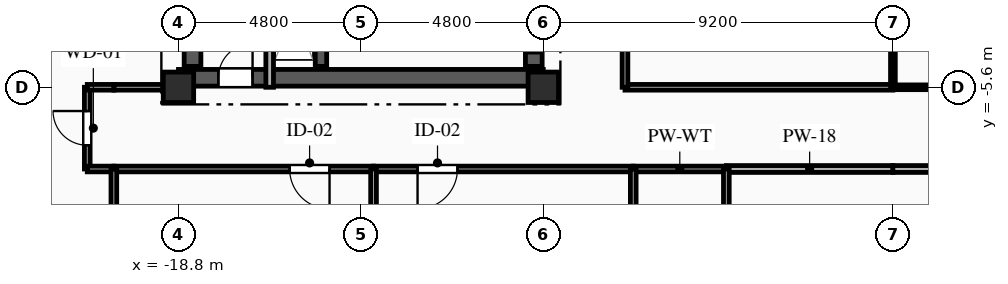
"""IFC4 building model, lengths in metres.
Left out: names, types, materials, properties, quantities, classifications, styles, units other than length and angle.
Written with IfcOpenShell. Run it as: python <this file> out.ifc"""

import sys

from ifc_helpers import new_model, si_unit, direction, frame, frame_2d, origin, origin_2d, place, context, subcontext, project, spatial, rectangle, extrude, element, fill, save


model = new_model("IFC4")
c1 = context("Model", 3, precision=1e-05, world=origin(), true_north=direction((0.0, 1.0)))
c2 = subcontext(c1, "Body", "Model", "MODEL_VIEW")
j1 = project(units=[si_unit("LENGTHUNIT", "METRE"), si_unit("PLANEANGLEUNIT", "RADIAN")], contexts=[c1])
p1 = place(None, origin())
s1 = spatial("IfcSite", under=j1, at=p1, CompositionType="ELEMENT")
p2 = place(p1, origin())
s2 = spatial("IfcBuilding", under=s1, at=p2, CompositionType="ELEMENT")
p3 = place(p2, frame((0.0, 0.0, 238.35)))
s3 = spatial("IfcBuildingStorey", under=s2, at=p3, CompositionType="ELEMENT", Elevation=238.35)
for number, where, z_axis, x_axis in (
    (1, (-18.8, -5.6, 0.0), (0.0, 0.0, 1.0), (1.0, 0.0, 0.0)),
    (2, (-9.2, -5.6, 0.0), (0.0, 0.0, 1.0), (1.0, 0.0, 0.0)),
):
    element("IfcColumn", number, at=place(p3, frame(where, z_axis=z_axis, x_axis=x_axis)), inside=s3, PredefinedType="COLUMN", context=c2, shape_type="SweptSolid", body=[
        extrude(rectangle(XDim=0.8, YDim=0.8, at=origin_2d()), origin(), (0.0, 0.0, 1.0), 3.35),
    ])
p4 = place(p3, frame((-18.8, -5.35, 0.0), z_axis=(0.0, 0.0, 1.0), x_axis=(1.0, 0.0, 0.0)))
e3 = element("IfcWall", 3, at=p4, inside=s3, PredefinedType="SHEAR", context=c2, shape_type="SweptSolid", body=[
    extrude(rectangle(XDim=9.6, YDim=0.44, at=frame_2d((4.8, 0.0))), origin(), (0.0, 0.0, 1.0), 3.04),
])
p5 = place(p4, frame((1.05, 0.0, 0.0)))
e4 = element("IfcOpeningElement", 4, at=p5, cuts=e3, PredefinedType="OPENING", context=c2, shape_type="SweptSolid", body=[
    extrude(rectangle(XDim=0.9, YDim=2.1, at=frame_2d((0.45, 1.05))), frame((0.0, 0.23, 0.0), z_axis=(0.0, -1.0, 0.0), x_axis=(1.0, 0.0, 0.0)), (0.0, 0.0, 1.0), 0.46),
])
p6 = place(p3, frame((-18.43, -5.05, 0.0), z_axis=(0.0, 0.0, 1.0), x_axis=(0.0, 1.0, 0.0)))
e5 = element("IfcWall", 5, at=p6, inside=s3, PredefinedType="SHEAR", context=c2, shape_type="SweptSolid", body=[
    extrude(rectangle(XDim=10.1, YDim=0.44, at=frame_2d((5.05, 0.0))), origin(), (0.0, 0.0, 1.0), 3.04),
])
p7 = place(p3, frame((-9.45, -5.05, 0.0), z_axis=(0.0, 0.0, 1.0), x_axis=(0.0, 1.0, 0.0)))
e6 = element("IfcWall", 6, at=p7, inside=s3, PredefinedType="SHEAR", context=c2, shape_type="SweptSolid", body=[
    extrude(rectangle(XDim=10.1, YDim=0.44, at=frame_2d((5.05, 0.0))), origin(), (0.0, 0.0, 1.0), 3.04),
])
p8 = place(p7, frame((7.15, 0.0, 0.0)))
e7 = element("IfcOpeningElement", 7, at=p8, cuts=e6, PredefinedType="OPENING", context=c2, shape_type="SweptSolid", body=[
    extrude(rectangle(XDim=0.9, YDim=2.1, at=frame_2d((0.45, 1.05))), frame((0.0, 0.23, 0.0), z_axis=(0.0, -1.0, 0.0), x_axis=(1.0, 0.0, 0.0)), (0.0, 0.0, 1.0), 0.46),
])
p9 = place(p7, frame((2.4, 0.0, 0.0)))
e8 = element("IfcOpeningElement", 8, at=p9, cuts=e6, PredefinedType="OPENING", context=c2, shape_type="SweptSolid", body=[
    extrude(rectangle(XDim=1.2, YDim=2.15, at=frame_2d((0.6, 1.075))), frame((0.0, 0.23, 0.0), z_axis=(0.0, -1.0, 0.0), x_axis=(1.0, 0.0, 0.0)), (0.0, 0.0, 1.0), 0.46),
])
p10 = place(p7, frame((0.35, 0.0, 0.0)))
e9 = element("IfcOpeningElement", 9, at=p10, cuts=e6, PredefinedType="OPENING", context=c2, shape_type="SweptSolid", body=[
    extrude(rectangle(XDim=0.9, YDim=2.1, at=frame_2d((0.45, 1.05))), frame((0.0, 0.23, 0.0), z_axis=(0.0, -1.0, 0.0), x_axis=(1.0, 0.0, 0.0)), (0.0, 0.0, 1.0), 0.46),
])
p11 = place(p7, frame((5.0, 0.0, 0.0)))
e10 = element("IfcOpeningElement", 10, at=p11, cuts=e6, PredefinedType="OPENING", context=c2, shape_type="SweptSolid", body=[
    extrude(rectangle(XDim=0.9, YDim=2.1, at=frame_2d((0.45, 1.05))), frame((0.0, 0.23, 0.0), z_axis=(0.0, -1.0, 0.0), x_axis=(1.0, 0.0, 0.0)), (0.0, 0.0, 1.0), 0.46),
])
p12 = place(p3, frame((-15.05, -5.05, 0.0), z_axis=(0.0, 0.0, 1.0), x_axis=(0.0, 1.0, 0.0)))
e11 = element("IfcWall", 11, at=p12, inside=s3, PredefinedType="SHEAR", context=c2, shape_type="SweptSolid", body=[
    extrude(rectangle(XDim=10.1, YDim=0.3, at=frame_2d((5.05, 0.0))), origin(), (0.0, 0.0, 1.0), 3.04),
])
p13 = place(p3, frame((-16.4, -5.6, 0.0), z_axis=(0.0, 0.0, 1.0), x_axis=(0.0, 1.0, 0.0)))
e12 = element("IfcWall", 12, at=p13, inside=s3, PredefinedType="PARTITIONING", context=c2, shape_type="SweptSolid", body=[
    extrude(rectangle(XDim=3.49, YDim=0.2, at=frame_2d((1.745, 0.0))), origin(), (0.0, 0.0, 1.0), 3.04),
])
p14 = place(p3, frame((-21.2, -7.75, 0.0), z_axis=(0.0, 0.0, 1.0), x_axis=(0.0, 1.0, 0.0)))
e13 = element("IfcWall", 13, at=p14, inside=s3, PredefinedType="PARTITIONING", context=c2, shape_type="SweptSolid", body=[
    extrude(rectangle(XDim=2.15, YDim=0.15, at=frame_2d((1.075, 0.0))), origin(), (0.0, 0.0, 1.0), 2.695),
])
p15 = place(p14, frame((0.625, 0.0, 0.0)))
e14 = element("IfcOpeningElement", 14, at=p15, cuts=e13, PredefinedType="OPENING", context=c2, shape_type="SweptSolid", body=[
    extrude(rectangle(XDim=0.9, YDim=2.1, at=frame_2d((0.45, 1.05))), frame((0.0, 0.085, 0.0), z_axis=(0.0, -1.0, 0.0), x_axis=(1.0, 0.0, 0.0)), (0.0, 0.0, 1.0), 0.17),
])
p16 = place(p3, frame((-20.5, -5.6, 0.0), z_axis=(0.0, 0.0, 1.0), x_axis=(1.0, 0.0, 0.0)))
e15 = element("IfcWall", 15, at=p16, inside=s3, PredefinedType="PARTITIONING", context=c2, shape_type="SweptSolid", body=[
    extrude(rectangle(XDim=1.7, YDim=0.15, at=frame_2d((0.85, 0.0))), origin(), (0.0, 0.0, 1.0), 3.04),
])
for number, where, z_axis, x_axis in (
    (16, (-20.5, -7.75, 0.0), (0.0, 0.0, 1.0), (-1.0, 0.0, 0.0)),
    (17, (-21.2, -5.6, 0.0), (0.0, 0.0, 1.0), (1.0, 0.0, 0.0)),
):
    element("IfcWall", number, at=place(p3, frame(where, z_axis=z_axis, x_axis=x_axis)), inside=s3, PredefinedType="PARTITIONING", context=c2, shape_type="SweptSolid", body=[
        extrude(rectangle(XDim=0.7, YDim=0.15, at=frame_2d((0.35, 0.0))), origin(), (0.0, 0.0, 1.0), 3.04),
    ])
p17 = place(p3, frame((-13.667, -7.75, 0.0), z_axis=(0.0, 0.0, 1.0), x_axis=(-1.0, 0.0, 0.0)))
e18 = element("IfcWall", 18, at=p17, inside=s3, PredefinedType="PARTITIONING", context=c2, shape_type="SweptSolid", body=[
    extrude(rectangle(XDim=6.833, YDim=0.15, at=frame_2d((3.417, 0.0))), origin(), (0.0, 0.0, 1.0), 3.04),
])
p18 = place(p17, frame((1.158, 0.0, 0.0)))
e19 = element("IfcOpeningElement", 19, at=p18, cuts=e18, PredefinedType="OPENING", context=c2, shape_type="SweptSolid", body=[
    extrude(rectangle(XDim=1.05, YDim=2.15, at=frame_2d((0.525, 1.075))), frame((0.0, 0.085, 0.0), z_axis=(0.0, -1.0, 0.0), x_axis=(1.0, 0.0, 0.0)), (0.0, 0.0, 1.0), 0.17),
])
p19 = place(p3, frame((-6.833, -7.75, 0.0), z_axis=(0.0, 0.0, 1.0), x_axis=(-1.0, 0.0, 0.0)))
e20 = element("IfcWall", 20, at=p19, inside=s3, PredefinedType="PARTITIONING", context=c2, shape_type="SweptSolid", body=[
    extrude(rectangle(XDim=6.833, YDim=0.15, at=frame_2d((3.417, 0.0))), origin(), (0.0, 0.0, 1.0), 3.04),
])
p20 = place(p19, frame((4.625, 0.0, 0.0)))
e21 = element("IfcOpeningElement", 21, at=p20, cuts=e20, PredefinedType="OPENING", context=c2, shape_type="SweptSolid", body=[
    extrude(rectangle(XDim=1.05, YDim=2.15, at=frame_2d((0.525, 1.075))), frame((0.0, 0.085, 0.0), z_axis=(0.0, -1.0, 0.0), x_axis=(1.0, 0.0, 0.0)), (0.0, 0.0, 1.0), 0.17),
])
p21 = place(p3, frame((0.0, -7.75, 0.0), z_axis=(0.0, 0.0, 1.0), x_axis=(-1.0, 0.0, 0.0)))
e22 = element("IfcWall", 22, at=p21, inside=s3, PredefinedType="PARTITIONING", context=c2, shape_type="SweptSolid", body=[
    extrude(rectangle(XDim=4.383, YDim=0.18, at=frame_2d((2.191, 0.0))), origin(), (0.0, 0.0, 1.0), 3.04),
])
p22 = place(p3, frame((-4.383, -7.75, 0.0), z_axis=(0.0, 0.0, 1.0), x_axis=(-1.0, 0.0, 0.0)))
e23 = element("IfcWall", 23, at=p22, inside=s3, PredefinedType="PLUMBINGWALL", context=c2, shape_type="SweptSolid", body=[
    extrude(rectangle(XDim=2.45, YDim=0.15, at=frame_2d((1.225, 0.0))), origin(), (0.0, 0.0, 1.0), 3.04),
])
p23 = place(p3, frame((-7.05, -5.6, 0.0), z_axis=(0.0, 0.0, 1.0), x_axis=(1.0, 0.0, 0.0)))
e24 = element("IfcWall", 24, at=p23, inside=s3, PredefinedType="PARTITIONING", context=c2, shape_type="SweptSolid", body=[
    extrude(rectangle(XDim=7.05, YDim=0.15, at=frame_2d((3.525, 0.0))), origin(), (0.0, 0.0, 1.0), 2.525),
])
p24 = place(p3, frame((6.833, -7.75, 0.0), z_axis=(0.0, 0.0, 1.0), x_axis=(-1.0, 0.0, 0.0)))
e25 = element("IfcWall", 25, at=p24, inside=s3, PredefinedType="PARTITIONING", context=c2, shape_type="SweptSolid", body=[
    extrude(rectangle(XDim=6.833, YDim=0.18, at=frame_2d((3.417, 0.0))), origin(), (0.0, 0.0, 1.0), 3.04),
])
p25 = place(p24, frame((4.669, 0.0, 0.0)))
e26 = element("IfcOpeningElement", 26, at=p25, cuts=e25, PredefinedType="OPENING", context=c2, shape_type="SweptSolid", body=[
    extrude(rectangle(XDim=1.0, YDim=2.15, at=frame_2d((0.5, 1.075))), frame((0.0, 0.1, 0.0), z_axis=(0.0, -1.0, 0.0), x_axis=(1.0, 0.0, 0.0)), (0.0, 0.0, 1.0), 0.2),
])
p26 = place(p3, frame((0.0, -5.6, 0.0), z_axis=(0.0, 0.0, 1.0), x_axis=(1.0, 0.0, 0.0)))
e27 = element("IfcWall", 27, at=p26, inside=s3, PredefinedType="PARTITIONING", context=c2, shape_type="SweptSolid", body=[
    extrude(rectangle(XDim=7.05, YDim=0.125, at=frame_2d((3.525, 0.0))), origin(), (0.0, 0.0, 1.0), 2.525),
])
p27 = place(p3, frame((-7.05, 8.5, 0.0), z_axis=(0.0, 0.0, 1.0), x_axis=(0.0, -1.0, 0.0)))
e28 = element("IfcWall", 28, at=p27, inside=s3, PredefinedType="PARTITIONING", context=c2, shape_type="SweptSolid", body=[
    extrude(rectangle(XDim=14.1, YDim=0.15, at=frame_2d((7.05, 0.0))), origin(), (0.0, 0.0, 1.0), 3.04),
])
p28 = place(p27, frame((8.074, 0.0, 0.0)))
e29 = element("IfcOpeningElement", 29, at=p28, cuts=e28, PredefinedType="OPENING", context=c2, shape_type="SweptSolid", body=[
    extrude(rectangle(XDim=0.95, YDim=2.1, at=frame_2d((0.475, 1.05))), frame((0.0, 0.085, 0.0), z_axis=(0.0, -1.0, 0.0), x_axis=(1.0, 0.0, 0.0)), (0.0, 0.0, 1.0), 0.17),
])
p29 = place(p3, frame((-20.5, -7.75, 0.0), z_axis=(0.0, 0.0, 1.0), x_axis=(0.0, -1.0, 0.0)))
e30 = element("IfcWall", 30, at=p29, inside=s3, PredefinedType="PARTITIONING", context=c2, shape_type="SweptSolid", body=[
    extrude(rectangle(XDim=10.65, YDim=0.15, at=frame_2d((5.325, 0.0))), origin(), (0.0, 0.0, 1.0), 2.665),
])
p30 = place(p3, frame((-13.667, -7.75, 0.0), z_axis=(0.0, 0.0, 1.0), x_axis=(0.0, -1.0, 0.0)))
e31 = element("IfcWall", 31, at=p30, inside=s3, PredefinedType="PARTITIONING", context=c2, shape_type="SweptSolid", body=[
    extrude(rectangle(XDim=10.65, YDim=0.15, at=frame_2d((5.325, 0.0))), origin(), (0.0, 0.0, 1.0), 3.04),
])
for number, where, z_axis, x_axis in (
    (32, (-6.833, -7.75, 0.0), (0.0, 0.0, 1.0), (0.0, -1.0, 0.0)),
    (33, (-4.383, -9.9, 0.0), (0.0, 0.0, 1.0), (0.0, 1.0, 0.0)),
):
    element("IfcWall", number, at=place(p3, frame(where, z_axis=z_axis, x_axis=x_axis)), inside=s3, PredefinedType="PLUMBINGWALL", context=c2, shape_type="SweptSolid", body=[
        extrude(rectangle(XDim=2.15, YDim=0.15, at=frame_2d((1.075, 0.0))), origin(), (0.0, 0.0, 1.0), 3.04),
    ])
p31 = place(p3, frame((0.0, 8.5, 0.0), z_axis=(0.0, 0.0, 1.0), x_axis=(0.0, -1.0, 0.0)))
e34 = element("IfcWall", 34, at=p31, inside=s3, PredefinedType="PARTITIONING", context=c2, shape_type="SweptSolid", body=[
    extrude(rectangle(XDim=14.1, YDim=0.125, at=frame_2d((7.05, 0.0))), origin(), (0.0, 0.0, 1.0), 3.04),
])
p32 = place(p5, origin())
e35 = element("IfcDoor", 35, at=p32, inside=s3, OperationType="SINGLE_SWING_RIGHT", PredefinedType="DOOR", context=c2, shape_type="SweptSolid", body=[
    extrude(rectangle(XDim=0.9, YDim=2.1, at=frame_2d((0.45, 1.05))), frame((0.0, 0.025, 0.0), z_axis=(0.0, -1.0, 0.0), x_axis=(1.0, 0.0, 0.0)), (0.0, 0.0, 1.0), 0.05),
])
fill(e4, e35)
p33 = place(p10, origin())
e36 = element("IfcDoor", 36, at=p33, inside=s3, OperationType="SINGLE_SWING_RIGHT", PredefinedType="DOOR", context=c2, shape_type="SweptSolid", body=[
    extrude(rectangle(XDim=0.9, YDim=2.1, at=frame_2d((0.45, 1.05))), frame((0.0, 0.025, 0.0), z_axis=(0.0, -1.0, 0.0), x_axis=(1.0, 0.0, 0.0)), (0.0, 0.0, 1.0), 0.05),
])
fill(e9, e36)
p34 = place(p15, origin())
e37 = element("IfcDoor", 37, at=p34, inside=s3, OperationType="SINGLE_SWING_RIGHT", PredefinedType="DOOR", context=c2, shape_type="SweptSolid", body=[
    extrude(rectangle(XDim=0.9, YDim=2.1, at=frame_2d((0.45, 1.05))), frame((0.0, 0.025, 0.0), z_axis=(0.0, -1.0, 0.0), x_axis=(1.0, 0.0, 0.0)), (0.0, 0.0, 1.0), 0.05),
])
fill(e14, e37)
p35 = place(p18, origin())
e38 = element("IfcDoor", 38, at=p35, inside=s3, OperationType="SINGLE_SWING_LEFT", PredefinedType="DOOR", context=c2, shape_type="SweptSolid", body=[
    extrude(rectangle(XDim=1.05, YDim=2.15, at=frame_2d((0.525, 1.075))), frame((0.0, 0.025, 0.0), z_axis=(0.0, -1.0, 0.0), x_axis=(1.0, 0.0, 0.0)), (0.0, 0.0, 1.0), 0.05),
])
fill(e19, e38)
p36 = place(p20, origin())
e39 = element("IfcDoor", 39, at=p36, inside=s3, OperationType="SINGLE_SWING_RIGHT", PredefinedType="DOOR", context=c2, shape_type="SweptSolid", body=[
    extrude(rectangle(XDim=1.05, YDim=2.15, at=frame_2d((0.525, 1.075))), frame((0.0, 0.025, 0.0), z_axis=(0.0, -1.0, 0.0), x_axis=(1.0, 0.0, 0.0)), (0.0, 0.0, 1.0), 0.05),
])
fill(e21, e39)
save(model, sys.argv[1])
